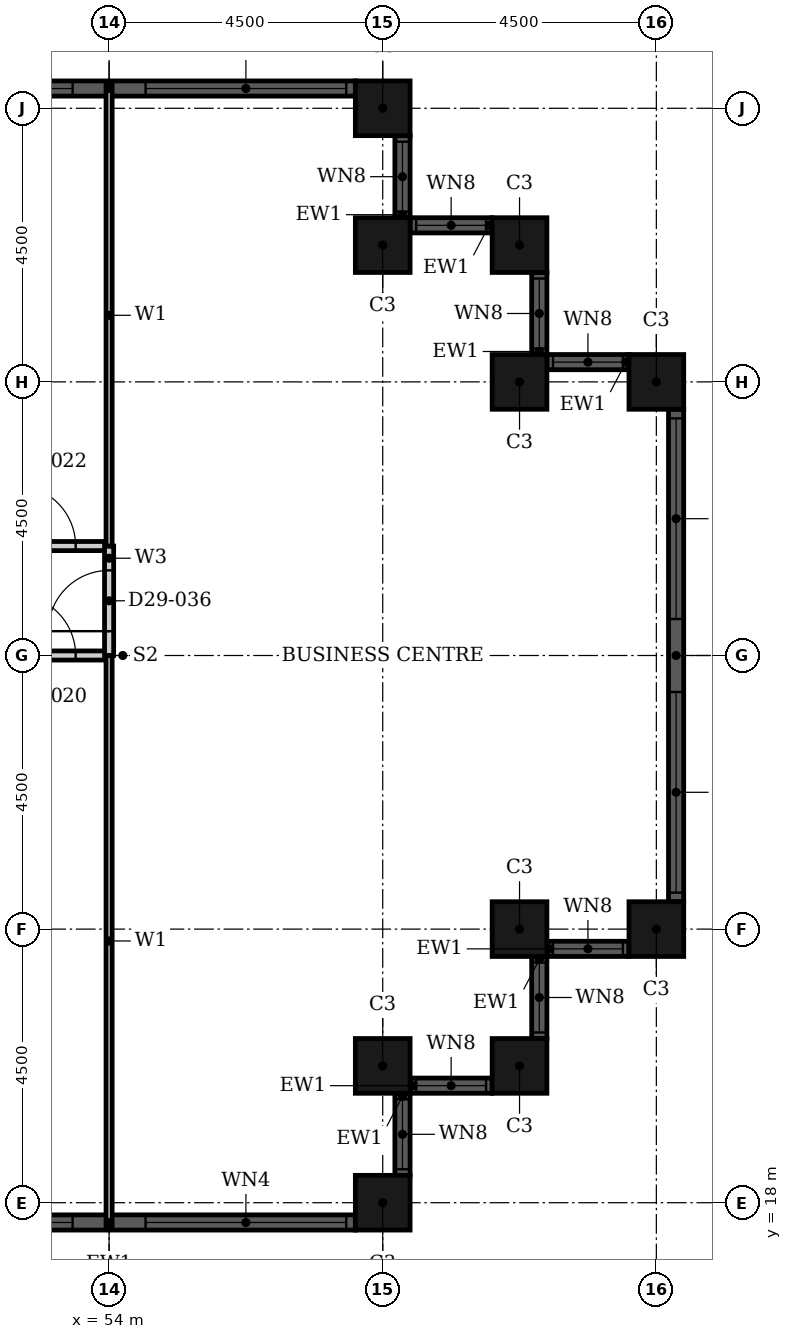
"""IFC4 building model, lengths in metres.
Left out: names, types, materials, properties, quantities, classifications, styles, units other than length and angle.
Written with IfcOpenShell. Run it as: python <this file> out.ifc"""

import sys

from ifc_helpers import new_model, si_unit, direction, frame, frame_2d, origin, origin_2d, place, context, subcontext, project, spatial, rectangle, hollow_rectangle, extrude, element, fill, save


model = new_model("IFC4")
c1 = context("Model", 3, precision=1e-05, world=origin(), true_north=direction((0.0, 1.0)))
c2 = subcontext(c1, "Body", "Model", "MODEL_VIEW")
j1 = project(units=[si_unit("LENGTHUNIT", "METRE"), si_unit("PLANEANGLEUNIT", "RADIAN")], contexts=[c1])
p1 = place(None, origin())
s1 = spatial("IfcSite", under=j1, at=p1, CompositionType="ELEMENT")
p2 = place(p1, origin())
s2 = spatial("IfcBuilding", under=s1, at=p2, CompositionType="ELEMENT")
p3 = place(p2, frame((0.0, 0.0, 118.8)))
s3 = spatial("IfcBuildingStorey", under=s2, at=p3, CompositionType="ELEMENT", Elevation=118.8)
for number, where, z_axis, x_axis in (
    (1, (58.5, 18.0, 0.0), (0.0, 0.0, 1.0), (1.0, 0.0, 0.0)),
    (2, (58.5, 20.25, 0.0), (0.0, 0.0, 1.0), (1.0, 0.0, 0.0)),
    (3, (60.75, 20.25, 0.0), (0.0, 0.0, 1.0), (1.0, 0.0, 0.0)),
    (4, (60.75, 22.5, 0.0), (0.0, 0.0, 1.0), (1.0, 0.0, 0.0)),
    (5, (63.0, 22.5, 0.0), (0.0, 0.0, 1.0), (1.0, 0.0, 0.0)),
    (6, (63.0, 31.5, 0.0), (0.0, 0.0, 1.0), (1.0, 0.0, 0.0)),
    (7, (60.75, 31.5, 0.0), (0.0, 0.0, 1.0), (1.0, 0.0, 0.0)),
    (8, (60.75, 33.75, 0.0), (0.0, 0.0, 1.0), (1.0, 0.0, 0.0)),
    (9, (58.5, 33.75, 0.0), (0.0, 0.0, 1.0), (1.0, 0.0, 0.0)),
    (10, (58.5, 36.0, 0.0), (0.0, 0.0, 1.0), (1.0, 0.0, 0.0)),
):
    element("IfcColumn", number, at=place(p3, frame(where, z_axis=z_axis, x_axis=x_axis)), inside=s3, PredefinedType="COLUMN", context=c2, shape_type="SweptSolid", body=[
        extrude(hollow_rectangle(XDim=0.9, YDim=0.9, WallThickness=0.028, at=origin_2d()), origin(), (0.0, 0.0, 1.0), 3.6),
    ])
p4 = place(p3, frame((49.95, 17.675, 0.0), z_axis=(0.0, 0.0, 1.0), x_axis=(1.0, 0.0, 0.0)))
e11 = element("IfcWall", 11, at=p4, inside=s3, PredefinedType="SOLIDWALL", context=c2, shape_type="SweptSolid", body=[
    extrude(rectangle(XDim=8.1, YDim=0.25, at=frame_2d((4.05, 0.0))), origin(), (0.0, 0.0, 1.0), 3.6),
])
p5 = place(p4, frame((0.15, 0.0, 0.9)))
e12 = element("IfcOpeningElement", 12, at=p5, cuts=e11, PredefinedType="OPENING", context=c2, shape_type="SweptSolid", body=[
    extrude(rectangle(XDim=3.3, YDim=2.08, at=frame_2d((1.65, 1.04))), frame((0.0, 0.135, 0.0), z_axis=(0.0, -1.0, 0.0), x_axis=(1.0, 0.0, 0.0)), (0.0, 0.0, 1.0), 0.27),
])
p6 = place(p4, frame((4.65, 0.0, 0.9)))
e13 = element("IfcOpeningElement", 13, at=p6, cuts=e11, PredefinedType="OPENING", context=c2, shape_type="SweptSolid", body=[
    extrude(rectangle(XDim=3.3, YDim=2.08, at=frame_2d((1.65, 1.04))), frame((0.0, 0.135, 0.0), z_axis=(0.0, -1.0, 0.0), x_axis=(1.0, 0.0, 0.0)), (0.0, 0.0, 1.0), 0.27),
])
p7 = place(p3, frame((58.825, 18.45, 0.0), z_axis=(0.0, 0.0, 1.0), x_axis=(0.0, 1.0, 0.0)))
e14 = element("IfcWall", 14, at=p7, inside=s3, PredefinedType="SOLIDWALL", context=c2, shape_type="SweptSolid", body=[
    extrude(rectangle(XDim=1.35, YDim=0.25, at=frame_2d((0.675, 0.0))), origin(), (0.0, 0.0, 1.0), 3.6),
])
p8 = place(p7, frame((0.1, 0.0, 0.9)))
e15 = element("IfcOpeningElement", 15, at=p8, cuts=e14, PredefinedType="OPENING", context=c2, shape_type="SweptSolid", body=[
    extrude(rectangle(XDim=1.15, YDim=2.08, at=frame_2d((0.575, 1.04))), frame((0.0, 0.135, 0.0), z_axis=(0.0, -1.0, 0.0), x_axis=(1.0, 0.0, 0.0)), (0.0, 0.0, 1.0), 0.27),
])
p9 = place(p3, frame((58.95, 19.925, 0.0), z_axis=(0.0, 0.0, 1.0), x_axis=(1.0, 0.0, 0.0)))
e16 = element("IfcWall", 16, at=p9, inside=s3, PredefinedType="SOLIDWALL", context=c2, shape_type="SweptSolid", body=[
    extrude(rectangle(XDim=1.35, YDim=0.25, at=frame_2d((0.675, 0.0))), origin(), (0.0, 0.0, 1.0), 3.6),
])
p10 = place(p9, frame((0.1, 0.0, 0.9)))
e17 = element("IfcOpeningElement", 17, at=p10, cuts=e16, PredefinedType="OPENING", context=c2, shape_type="SweptSolid", body=[
    extrude(rectangle(XDim=1.15, YDim=2.08, at=frame_2d((0.575, 1.04))), frame((0.0, 0.135, 0.0), z_axis=(0.0, -1.0, 0.0), x_axis=(1.0, 0.0, 0.0)), (0.0, 0.0, 1.0), 0.27),
])
p11 = place(p3, frame((61.075, 20.7, 0.0), z_axis=(0.0, 0.0, 1.0), x_axis=(0.0, 1.0, 0.0)))
e18 = element("IfcWall", 18, at=p11, inside=s3, PredefinedType="SOLIDWALL", context=c2, shape_type="SweptSolid", body=[
    extrude(rectangle(XDim=1.35, YDim=0.25, at=frame_2d((0.675, 0.0))), origin(), (0.0, 0.0, 1.0), 3.6),
])
p12 = place(p11, frame((0.1, 0.0, 0.9)))
e19 = element("IfcOpeningElement", 19, at=p12, cuts=e18, PredefinedType="OPENING", context=c2, shape_type="SweptSolid", body=[
    extrude(rectangle(XDim=1.15, YDim=2.08, at=frame_2d((0.575, 1.04))), frame((0.0, 0.135, 0.0), z_axis=(0.0, -1.0, 0.0), x_axis=(1.0, 0.0, 0.0)), (0.0, 0.0, 1.0), 0.27),
])
p13 = place(p3, frame((61.2, 22.175, 0.0), z_axis=(0.0, 0.0, 1.0), x_axis=(1.0, 0.0, 0.0)))
e20 = element("IfcWall", 20, at=p13, inside=s3, PredefinedType="SOLIDWALL", context=c2, shape_type="SweptSolid", body=[
    extrude(rectangle(XDim=1.35, YDim=0.25, at=frame_2d((0.675, 0.0))), origin(), (0.0, 0.0, 1.0), 3.6),
])
p14 = place(p13, frame((0.1, 0.0, 0.9)))
e21 = element("IfcOpeningElement", 21, at=p14, cuts=e20, PredefinedType="OPENING", context=c2, shape_type="SweptSolid", body=[
    extrude(rectangle(XDim=1.15, YDim=2.08, at=frame_2d((0.575, 1.04))), frame((0.0, 0.135, 0.0), z_axis=(0.0, -1.0, 0.0), x_axis=(1.0, 0.0, 0.0)), (0.0, 0.0, 1.0), 0.27),
])
p15 = place(p3, frame((63.325, 22.95, 0.0), z_axis=(0.0, 0.0, 1.0), x_axis=(0.0, 1.0, 0.0)))
e22 = element("IfcWall", 22, at=p15, inside=s3, PredefinedType="SOLIDWALL", context=c2, shape_type="SweptSolid", body=[
    extrude(rectangle(XDim=8.1, YDim=0.25, at=frame_2d((4.05, 0.0))), origin(), (0.0, 0.0, 1.0), 3.6),
])
p16 = place(p15, frame((0.15, 0.0, 0.9)))
e23 = element("IfcOpeningElement", 23, at=p16, cuts=e22, PredefinedType="OPENING", context=c2, shape_type="SweptSolid", body=[
    extrude(rectangle(XDim=3.3, YDim=2.08, at=frame_2d((1.65, 1.04))), frame((0.0, 0.135, 0.0), z_axis=(0.0, -1.0, 0.0), x_axis=(1.0, 0.0, 0.0)), (0.0, 0.0, 1.0), 0.27),
])
p17 = place(p15, frame((4.65, 0.0, 0.9)))
e24 = element("IfcOpeningElement", 24, at=p17, cuts=e22, PredefinedType="OPENING", context=c2, shape_type="SweptSolid", body=[
    extrude(rectangle(XDim=3.3, YDim=2.08, at=frame_2d((1.65, 1.04))), frame((0.0, 0.135, 0.0), z_axis=(0.0, -1.0, 0.0), x_axis=(1.0, 0.0, 0.0)), (0.0, 0.0, 1.0), 0.27),
])
p18 = place(p3, frame((62.55, 31.825, 0.0), z_axis=(0.0, 0.0, 1.0), x_axis=(-1.0, 0.0, 0.0)))
e25 = element("IfcWall", 25, at=p18, inside=s3, PredefinedType="SOLIDWALL", context=c2, shape_type="SweptSolid", body=[
    extrude(rectangle(XDim=1.35, YDim=0.25, at=frame_2d((0.675, 0.0))), origin(), (0.0, 0.0, 1.0), 3.6),
])
p19 = place(p18, frame((0.1, 0.0, 0.9)))
e26 = element("IfcOpeningElement", 26, at=p19, cuts=e25, PredefinedType="OPENING", context=c2, shape_type="SweptSolid", body=[
    extrude(rectangle(XDim=1.15, YDim=2.08, at=frame_2d((0.575, 1.04))), frame((0.0, 0.135, 0.0), z_axis=(0.0, -1.0, 0.0), x_axis=(1.0, 0.0, 0.0)), (0.0, 0.0, 1.0), 0.27),
])
p20 = place(p3, frame((61.075, 31.95, 0.0), z_axis=(0.0, 0.0, 1.0), x_axis=(0.0, 1.0, 0.0)))
e27 = element("IfcWall", 27, at=p20, inside=s3, PredefinedType="SOLIDWALL", context=c2, shape_type="SweptSolid", body=[
    extrude(rectangle(XDim=1.35, YDim=0.25, at=frame_2d((0.675, 0.0))), origin(), (0.0, 0.0, 1.0), 3.6),
])
p21 = place(p20, frame((0.1, 0.0, 0.9)))
e28 = element("IfcOpeningElement", 28, at=p21, cuts=e27, PredefinedType="OPENING", context=c2, shape_type="SweptSolid", body=[
    extrude(rectangle(XDim=1.15, YDim=2.08, at=frame_2d((0.575, 1.04))), frame((0.0, 0.135, 0.0), z_axis=(0.0, -1.0, 0.0), x_axis=(1.0, 0.0, 0.0)), (0.0, 0.0, 1.0), 0.27),
])
p22 = place(p3, frame((60.3, 34.075, 0.0), z_axis=(0.0, 0.0, 1.0), x_axis=(-1.0, 0.0, 0.0)))
e29 = element("IfcWall", 29, at=p22, inside=s3, PredefinedType="SOLIDWALL", context=c2, shape_type="SweptSolid", body=[
    extrude(rectangle(XDim=1.35, YDim=0.25, at=frame_2d((0.675, 0.0))), origin(), (0.0, 0.0, 1.0), 3.6),
])
p23 = place(p22, frame((0.1, 0.0, 0.9)))
e30 = element("IfcOpeningElement", 30, at=p23, cuts=e29, PredefinedType="OPENING", context=c2, shape_type="SweptSolid", body=[
    extrude(rectangle(XDim=1.15, YDim=2.08, at=frame_2d((0.575, 1.04))), frame((0.0, 0.135, 0.0), z_axis=(0.0, -1.0, 0.0), x_axis=(1.0, 0.0, 0.0)), (0.0, 0.0, 1.0), 0.27),
])
p24 = place(p3, frame((58.825, 34.2, 0.0), z_axis=(0.0, 0.0, 1.0), x_axis=(0.0, 1.0, 0.0)))
e31 = element("IfcWall", 31, at=p24, inside=s3, PredefinedType="SOLIDWALL", context=c2, shape_type="SweptSolid", body=[
    extrude(rectangle(XDim=1.35, YDim=0.25, at=frame_2d((0.675, 0.0))), origin(), (0.0, 0.0, 1.0), 3.6),
])
p25 = place(p24, frame((0.1, 0.0, 0.9)))
e32 = element("IfcOpeningElement", 32, at=p25, cuts=e31, PredefinedType="OPENING", context=c2, shape_type="SweptSolid", body=[
    extrude(rectangle(XDim=1.15, YDim=2.08, at=frame_2d((0.575, 1.04))), frame((0.0, 0.135, 0.0), z_axis=(0.0, -1.0, 0.0), x_axis=(1.0, 0.0, 0.0)), (0.0, 0.0, 1.0), 0.27),
])
p26 = place(p3, frame((58.05, 36.325, 0.0), z_axis=(0.0, 0.0, 1.0), x_axis=(-1.0, 0.0, 0.0)))
e33 = element("IfcWall", 33, at=p26, inside=s3, PredefinedType="SOLIDWALL", context=c2, shape_type="SweptSolid", body=[
    extrude(rectangle(XDim=8.1, YDim=0.25, at=frame_2d((4.05, 0.0))), origin(), (0.0, 0.0, 1.0), 3.6),
])
p27 = place(p26, frame((0.15, 0.0, 0.9)))
e34 = element("IfcOpeningElement", 34, at=p27, cuts=e33, PredefinedType="OPENING", context=c2, shape_type="SweptSolid", body=[
    extrude(rectangle(XDim=3.3, YDim=2.08, at=frame_2d((1.65, 1.04))), frame((0.0, 0.135, 0.0), z_axis=(0.0, -1.0, 0.0), x_axis=(1.0, 0.0, 0.0)), (0.0, 0.0, 1.0), 0.27),
])
p28 = place(p26, frame((4.65, 0.0, 0.9)))
e35 = element("IfcOpeningElement", 35, at=p28, cuts=e33, PredefinedType="OPENING", context=c2, shape_type="SweptSolid", body=[
    extrude(rectangle(XDim=3.3, YDim=2.08, at=frame_2d((1.65, 1.04))), frame((0.0, 0.135, 0.0), z_axis=(0.0, -1.0, 0.0), x_axis=(1.0, 0.0, 0.0)), (0.0, 0.0, 1.0), 0.27),
])
p29 = place(p3, frame((46.8, 27.0, 0.0), z_axis=(0.0, 0.0, 1.0), x_axis=(1.0, 0.0, 0.0)))
e36 = element("IfcWall", 36, at=p29, inside=s3, PredefinedType="PARTITIONING", context=c2, shape_type="SweptSolid", body=[
    extrude(rectangle(XDim=7.2, YDim=0.15, at=frame_2d((3.6, 0.0))), origin(), (0.0, 0.0, 1.0), 2.58),
])
p30 = place(p29, frame((5.65, 0.0, 0.0)))
e37 = element("IfcOpeningElement", 37, at=p30, cuts=e36, PredefinedType="OPENING", context=c2, shape_type="SweptSolid", body=[
    extrude(rectangle(XDim=1.0, YDim=2.1, at=frame_2d((0.5, 1.05))), frame((0.0, 0.085, 0.0), z_axis=(0.0, -1.0, 0.0), x_axis=(1.0, 0.0, 0.0)), (0.0, 0.0, 1.0), 0.17),
])
p31 = place(p3, frame((46.8, 28.8, 0.0), z_axis=(0.0, 0.0, 1.0), x_axis=(1.0, 0.0, 0.0)))
e38 = element("IfcWall", 38, at=p31, inside=s3, PredefinedType="PARTITIONING", context=c2, shape_type="SweptSolid", body=[
    extrude(rectangle(XDim=7.2, YDim=0.15, at=frame_2d((3.6, 0.0))), origin(), (0.0, 0.0, 1.0), 3.3),
])
p32 = place(p31, frame((5.65, 0.0, 0.0)))
e39 = element("IfcOpeningElement", 39, at=p32, cuts=e38, PredefinedType="OPENING", context=c2, shape_type="SweptSolid", body=[
    extrude(rectangle(XDim=1.0, YDim=2.1, at=frame_2d((0.5, 1.05))), frame((0.0, 0.085, 0.0), z_axis=(0.0, -1.0, 0.0), x_axis=(1.0, 0.0, 0.0)), (0.0, 0.0, 1.0), 0.17),
])
p33 = place(p3, frame((54.0, 27.0, 0.0), z_axis=(0.0, 0.0, 1.0), x_axis=(0.0, 1.0, 0.0)))
e40 = element("IfcWall", 40, at=p33, inside=s3, PredefinedType="PARTITIONING", context=c2, shape_type="SweptSolid", body=[
    extrude(rectangle(XDim=1.8, YDim=0.15, at=frame_2d((0.9, 0.0))), origin(), (0.0, 0.0, 1.0), 3.3),
])
p34 = place(p33, frame((0.4, 0.0, 0.0)))
e41 = element("IfcOpeningElement", 41, at=p34, cuts=e40, PredefinedType="OPENING", context=c2, shape_type="SweptSolid", body=[
    extrude(rectangle(XDim=1.0, YDim=2.1, at=frame_2d((0.5, 1.05))), frame((0.0, 0.085, 0.0), z_axis=(0.0, -1.0, 0.0), x_axis=(1.0, 0.0, 0.0)), (0.0, 0.0, 1.0), 0.17),
])
p35 = place(p3, frame((54.0, 28.8, 0.0), z_axis=(0.0, 0.0, 1.0), x_axis=(0.0, 1.0, 0.0)))
e42 = element("IfcWall", 42, at=p35, inside=s3, PredefinedType="PARTITIONING", context=c2, shape_type="SweptSolid", body=[
    extrude(rectangle(XDim=7.59, YDim=0.1, at=frame_2d((3.795, 0.0))), origin(), (0.0, 0.0, 1.0), 3.3),
])
p36 = place(p3, frame((54.0, 17.61, 0.0), z_axis=(0.0, 0.0, 1.0), x_axis=(0.0, 1.0, 0.0)))
e43 = element("IfcWall", 43, at=p36, inside=s3, PredefinedType="PARTITIONING", context=c2, shape_type="SweptSolid", body=[
    extrude(rectangle(XDim=9.39, YDim=0.1, at=frame_2d((4.695, 0.0))), origin(), (0.0, 0.0, 1.0), 3.3),
])
p37 = place(p5, origin())
e44 = element("IfcWindow", 44, at=p37, inside=s3, PartitioningType="SINGLE_PANEL", PredefinedType="WINDOW", context=c2, shape_type="SweptSolid", body=[
    extrude(rectangle(XDim=3.3, YDim=2.08, at=frame_2d((1.65, 1.04))), frame((0.0, 0.03, 0.0), z_axis=(0.0, -1.0, 0.0), x_axis=(1.0, 0.0, 0.0)), (0.0, 0.0, 1.0), 0.06),
])
fill(e12, e44)
p38 = place(p6, origin())
e45 = element("IfcWindow", 45, at=p38, inside=s3, PartitioningType="SINGLE_PANEL", PredefinedType="WINDOW", context=c2, shape_type="SweptSolid", body=[
    extrude(rectangle(XDim=3.3, YDim=2.08, at=frame_2d((1.65, 1.04))), frame((0.0, 0.03, 0.0), z_axis=(0.0, -1.0, 0.0), x_axis=(1.0, 0.0, 0.0)), (0.0, 0.0, 1.0), 0.06),
])
fill(e13, e45)
p39 = place(p8, origin())
e46 = element("IfcWindow", 46, at=p39, inside=s3, PartitioningType="SINGLE_PANEL", PredefinedType="WINDOW", context=c2, shape_type="SweptSolid", body=[
    extrude(rectangle(XDim=1.15, YDim=2.08, at=frame_2d((0.575, 1.04))), frame((0.0, 0.03, 0.0), z_axis=(0.0, -1.0, 0.0), x_axis=(1.0, 0.0, 0.0)), (0.0, 0.0, 1.0), 0.06),
])
fill(e15, e46)
p40 = place(p10, origin())
e47 = element("IfcWindow", 47, at=p40, inside=s3, PartitioningType="SINGLE_PANEL", PredefinedType="WINDOW", context=c2, shape_type="SweptSolid", body=[
    extrude(rectangle(XDim=1.15, YDim=2.08, at=frame_2d((0.575, 1.04))), frame((0.0, 0.03, 0.0), z_axis=(0.0, -1.0, 0.0), x_axis=(1.0, 0.0, 0.0)), (0.0, 0.0, 1.0), 0.06),
])
fill(e17, e47)
p41 = place(p12, origin())
e48 = element("IfcWindow", 48, at=p41, inside=s3, PartitioningType="SINGLE_PANEL", PredefinedType="WINDOW", context=c2, shape_type="SweptSolid", body=[
    extrude(rectangle(XDim=1.15, YDim=2.08, at=frame_2d((0.575, 1.04))), frame((0.0, 0.03, 0.0), z_axis=(0.0, -1.0, 0.0), x_axis=(1.0, 0.0, 0.0)), (0.0, 0.0, 1.0), 0.06),
])
fill(e19, e48)
p42 = place(p14, origin())
e49 = element("IfcWindow", 49, at=p42, inside=s3, PartitioningType="SINGLE_PANEL", PredefinedType="WINDOW", context=c2, shape_type="SweptSolid", body=[
    extrude(rectangle(XDim=1.15, YDim=2.08, at=frame_2d((0.575, 1.04))), frame((0.0, 0.03, 0.0), z_axis=(0.0, -1.0, 0.0), x_axis=(1.0, 0.0, 0.0)), (0.0, 0.0, 1.0), 0.06),
])
fill(e21, e49)
p43 = place(p16, origin())
e50 = element("IfcWindow", 50, at=p43, inside=s3, PartitioningType="SINGLE_PANEL", PredefinedType="WINDOW", context=c2, shape_type="SweptSolid", body=[
    extrude(rectangle(XDim=3.3, YDim=2.08, at=frame_2d((1.65, 1.04))), frame((0.0, 0.03, 0.0), z_axis=(0.0, -1.0, 0.0), x_axis=(1.0, 0.0, 0.0)), (0.0, 0.0, 1.0), 0.06),
])
fill(e23, e50)
p44 = place(p17, origin())
e51 = element("IfcWindow", 51, at=p44, inside=s3, PartitioningType="SINGLE_PANEL", PredefinedType="WINDOW", context=c2, shape_type="SweptSolid", body=[
    extrude(rectangle(XDim=3.3, YDim=2.08, at=frame_2d((1.65, 1.04))), frame((0.0, 0.03, 0.0), z_axis=(0.0, -1.0, 0.0), x_axis=(1.0, 0.0, 0.0)), (0.0, 0.0, 1.0), 0.06),
])
fill(e24, e51)
p45 = place(p19, origin())
e52 = element("IfcWindow", 52, at=p45, inside=s3, PartitioningType="SINGLE_PANEL", PredefinedType="WINDOW", context=c2, shape_type="SweptSolid", body=[
    extrude(rectangle(XDim=1.15, YDim=2.08, at=frame_2d((0.575, 1.04))), frame((0.0, 0.03, 0.0), z_axis=(0.0, -1.0, 0.0), x_axis=(1.0, 0.0, 0.0)), (0.0, 0.0, 1.0), 0.06),
])
fill(e26, e52)
p46 = place(p21, origin())
e53 = element("IfcWindow", 53, at=p46, inside=s3, PartitioningType="SINGLE_PANEL", PredefinedType="WINDOW", context=c2, shape_type="SweptSolid", body=[
    extrude(rectangle(XDim=1.15, YDim=2.08, at=frame_2d((0.575, 1.04))), frame((0.0, 0.03, 0.0), z_axis=(0.0, -1.0, 0.0), x_axis=(1.0, 0.0, 0.0)), (0.0, 0.0, 1.0), 0.06),
])
fill(e28, e53)
p47 = place(p23, origin())
e54 = element("IfcWindow", 54, at=p47, inside=s3, PartitioningType="SINGLE_PANEL", PredefinedType="WINDOW", context=c2, shape_type="SweptSolid", body=[
    extrude(rectangle(XDim=1.15, YDim=2.08, at=frame_2d((0.575, 1.04))), frame((0.0, 0.03, 0.0), z_axis=(0.0, -1.0, 0.0), x_axis=(1.0, 0.0, 0.0)), (0.0, 0.0, 1.0), 0.06),
])
fill(e30, e54)
p48 = place(p25, origin())
e55 = element("IfcWindow", 55, at=p48, inside=s3, PartitioningType="SINGLE_PANEL", PredefinedType="WINDOW", context=c2, shape_type="SweptSolid", body=[
    extrude(rectangle(XDim=1.15, YDim=2.08, at=frame_2d((0.575, 1.04))), frame((0.0, 0.03, 0.0), z_axis=(0.0, -1.0, 0.0), x_axis=(1.0, 0.0, 0.0)), (0.0, 0.0, 1.0), 0.06),
])
fill(e32, e55)
p49 = place(p27, origin())
e56 = element("IfcWindow", 56, at=p49, inside=s3, PartitioningType="SINGLE_PANEL", PredefinedType="WINDOW", context=c2, shape_type="SweptSolid", body=[
    extrude(rectangle(XDim=3.3, YDim=2.08, at=frame_2d((1.65, 1.04))), frame((0.0, 0.03, 0.0), z_axis=(0.0, -1.0, 0.0), x_axis=(1.0, 0.0, 0.0)), (0.0, 0.0, 1.0), 0.06),
])
fill(e34, e56)
p50 = place(p28, origin())
e57 = element("IfcWindow", 57, at=p50, inside=s3, PartitioningType="SINGLE_PANEL", PredefinedType="WINDOW", context=c2, shape_type="SweptSolid", body=[
    extrude(rectangle(XDim=3.3, YDim=2.08, at=frame_2d((1.65, 1.04))), frame((0.0, 0.03, 0.0), z_axis=(0.0, -1.0, 0.0), x_axis=(1.0, 0.0, 0.0)), (0.0, 0.0, 1.0), 0.06),
])
fill(e35, e57)
p51 = place(p30, origin())
e58 = element("IfcDoor", 58, at=p51, inside=s3, OperationType="SINGLE_SWING_RIGHT", PredefinedType="DOOR", context=c2, shape_type="SweptSolid", body=[
    extrude(rectangle(XDim=1.0, YDim=2.1, at=frame_2d((0.5, 1.05))), frame((0.0, 0.025, 0.0), z_axis=(0.0, -1.0, 0.0), x_axis=(1.0, 0.0, 0.0)), (0.0, 0.0, 1.0), 0.05),
])
fill(e37, e58)
p52 = place(p32, origin())
e59 = element("IfcDoor", 59, at=p52, inside=s3, OperationType="SINGLE_SWING_RIGHT", PredefinedType="DOOR", context=c2, shape_type="SweptSolid", body=[
    extrude(rectangle(XDim=1.0, YDim=2.1, at=frame_2d((0.5, 1.05))), frame((0.0, 0.025, 0.0), z_axis=(0.0, -1.0, 0.0), x_axis=(1.0, 0.0, 0.0)), (0.0, 0.0, 1.0), 0.05),
])
fill(e39, e59)
p53 = place(p34, origin())
e60 = element("IfcDoor", 60, at=p53, inside=s3, OperationType="SINGLE_SWING_LEFT", PredefinedType="DOOR", context=c2, shape_type="SweptSolid", body=[
    extrude(rectangle(XDim=1.0, YDim=2.1, at=frame_2d((0.5, 1.05))), frame((0.0, 0.025, 0.0), z_axis=(0.0, -1.0, 0.0), x_axis=(1.0, 0.0, 0.0)), (0.0, 0.0, 1.0), 0.05),
])
fill(e41, e60)
save(model, sys.argv[1])
